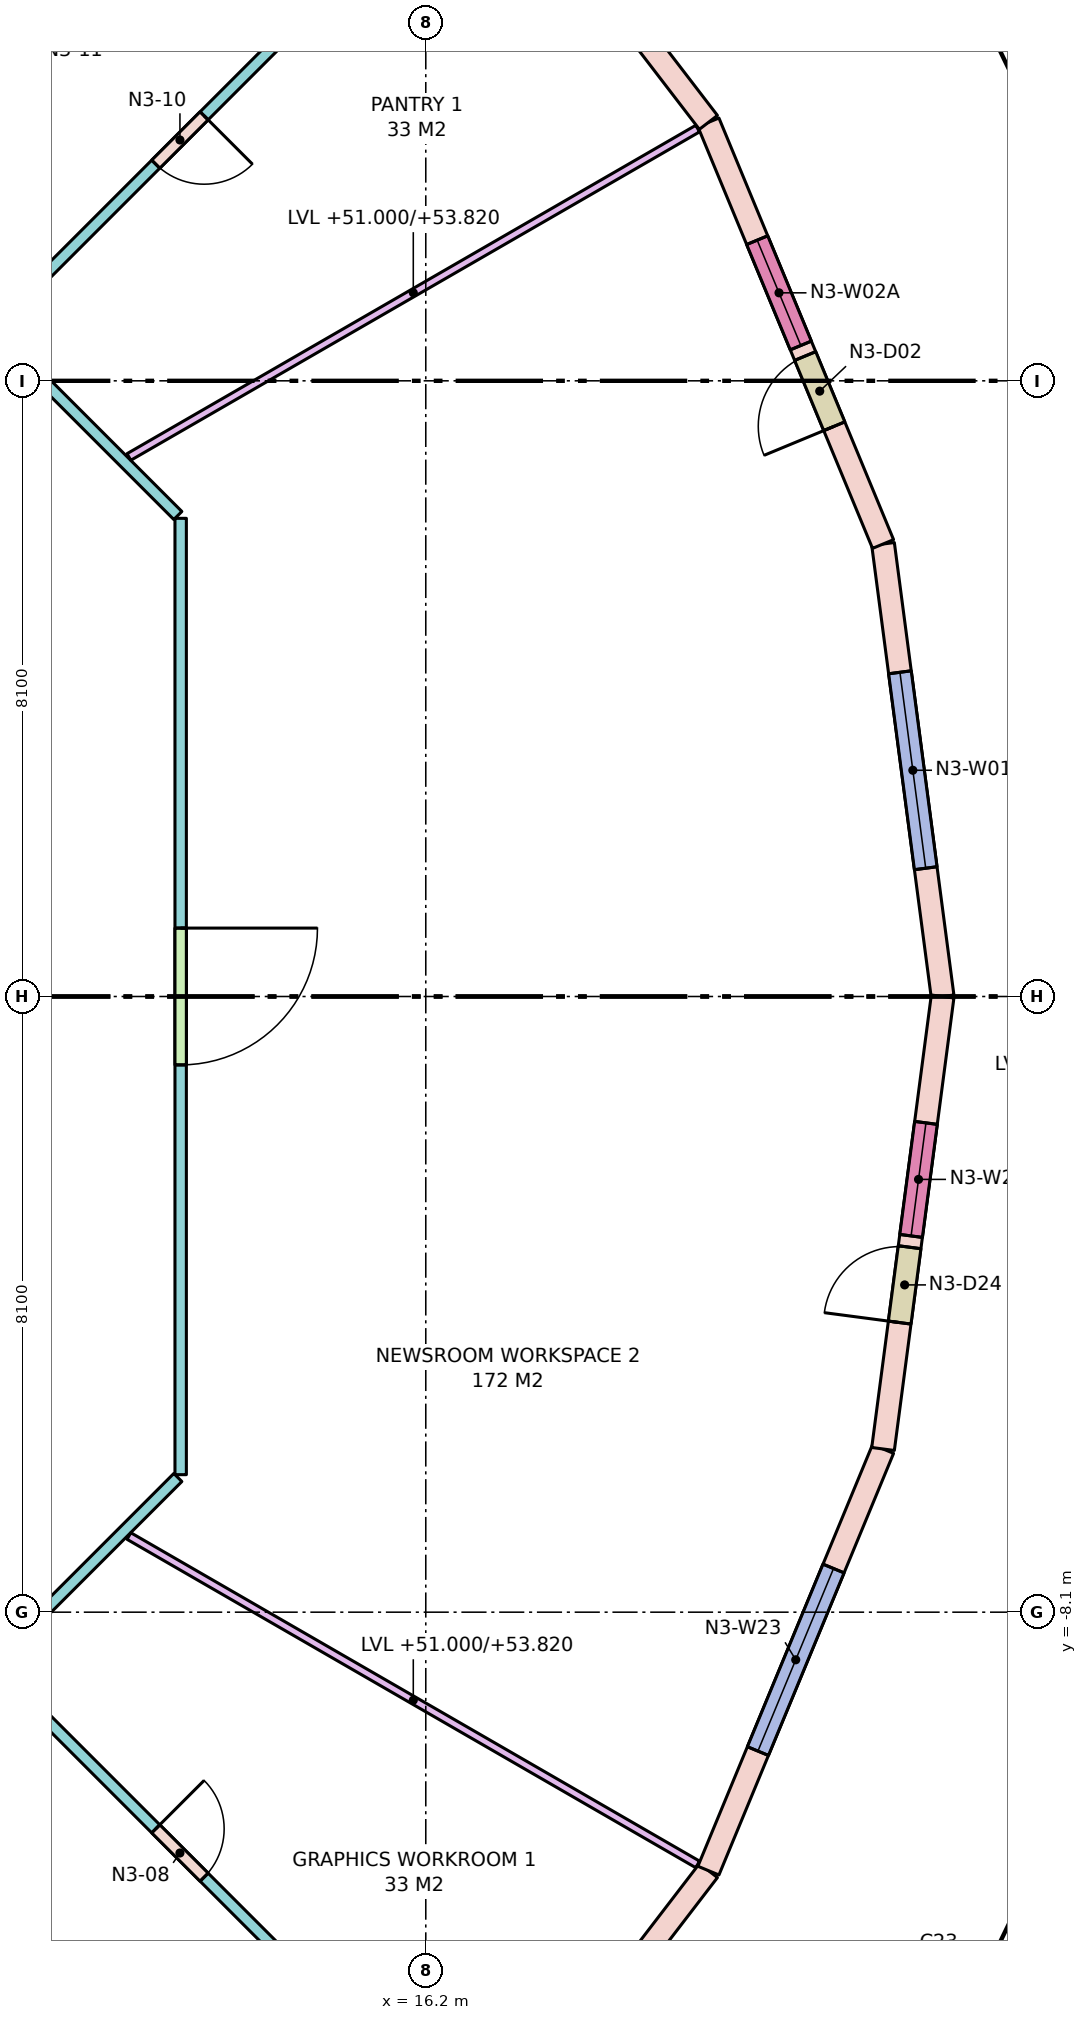
"""IFC4 building model, lengths in metres.
Left out: names, types, materials, properties, quantities, classifications, styles, units other than length and angle.
Written with IfcOpenShell. Run it as: python <this file> out.ifc"""

import sys

from ifc_helpers import new_model, si_unit, direction, frame, frame_2d, origin, place, context, subcontext, project, spatial, rectangle, extrude, element, fill, save


model = new_model("IFC4")
c1 = context("Model", 3, precision=1e-05, world=origin(), true_north=direction((0.0, 1.0)))
c2 = subcontext(c1, "Body", "Model", "MODEL_VIEW")
j1 = project(units=[si_unit("LENGTHUNIT", "METRE"), si_unit("PLANEANGLEUNIT", "RADIAN")], contexts=[c1])
p1 = place(None, origin())
s1 = spatial("IfcSite", under=j1, at=p1, CompositionType="ELEMENT")
p2 = place(p1, origin())
s2 = spatial("IfcBuilding", under=s1, at=p2, CompositionType="ELEMENT")
p3 = place(p2, frame((0.0, 0.0, 51.0)))
s3 = spatial("IfcBuildingStorey", under=s2, at=p3, CompositionType="ELEMENT", Elevation=51.0)
p4 = place(p3, frame((23.0, 0.0, 0.0), z_axis=(0.0, 0.0, 1.0), x_axis=(-0.130522880875, 0.991445297315, 0.0)))
e1 = element("IfcWall", 1, at=p4, inside=s3, PredefinedType="STANDARD", context=c2, shape_type="SweptSolid", body=[
    extrude(rectangle(XDim=6.004, YDim=0.3, at=frame_2d((3.002, 0.0))), origin(), (0.0, 0.0, 1.0), 3.72),
])
p5 = place(p4, frame((1.702, 0.0, 0.8)))
e2 = element("IfcOpeningElement", 2, at=p5, cuts=e1, PredefinedType="OPENING", context=c2, shape_type="SweptSolid", body=[
    extrude(rectangle(XDim=2.6, YDim=2.7, at=frame_2d((1.3, 1.35))), frame((0.0, 0.16, 0.0), z_axis=(0.0, -1.0, 0.0), x_axis=(1.0, 0.0, 0.0)), (0.0, 0.0, 1.0), 0.32),
])
p6 = place(p3, frame((22.216, 5.953, 0.0), z_axis=(0.0, 0.0, 1.0), x_axis=(-0.382671411433, 0.923884511653, 0.0)))
e3 = element("IfcWall", 3, at=p6, inside=s3, PredefinedType="STANDARD", context=c2, shape_type="SweptSolid", body=[
    extrude(rectangle(XDim=6.004, YDim=0.3, at=frame_2d((3.002, 0.0))), origin(), (0.0, 0.0, 1.0), 3.72),
])
p7 = place(p6, frame((1.677, 0.0, 0.0)))
e4 = element("IfcOpeningElement", 4, at=p7, cuts=e3, PredefinedType="OPENING", context=c2, shape_type="SweptSolid", body=[
    extrude(rectangle(XDim=1.0, YDim=2.4, at=frame_2d((0.5, 1.2))), frame((0.0, 0.16, 0.0), z_axis=(0.0, -1.0, 0.0), x_axis=(1.0, 0.0, 0.0)), (0.0, 0.0, 1.0), 0.32),
])
p8 = place(p6, frame((2.827, 0.0, 0.8)))
e5 = element("IfcOpeningElement", 5, at=p8, cuts=e3, PredefinedType="OPENING", context=c2, shape_type="SweptSolid", body=[
    extrude(rectangle(XDim=1.5, YDim=2.7, at=frame_2d((0.75, 1.35))), frame((0.0, 0.16, 0.0), z_axis=(0.0, -1.0, 0.0), x_axis=(1.0, 0.0, 0.0)), (0.0, 0.0, 1.0), 0.32),
])
p9 = place(p3, frame((19.919, 11.5, 0.0), z_axis=(0.0, 0.0, 1.0), x_axis=(-0.608778912074, 0.793339924758, 0.0)))
e6 = element("IfcWall", 6, at=p9, inside=s3, PredefinedType="STANDARD", context=c2, shape_type="SweptSolid", body=[
    extrude(rectangle(XDim=6.004, YDim=0.3, at=frame_2d((3.002, 0.0))), origin(), (0.0, 0.0, 1.0), 3.72),
])
p10 = place(p9, frame((1.702, 0.0, 0.8)))
e7 = element("IfcOpeningElement", 7, at=p10, cuts=e6, PredefinedType="OPENING", context=c2, shape_type="SweptSolid", body=[
    extrude(rectangle(XDim=2.6, YDim=2.7, at=frame_2d((1.3, 1.35))), frame((0.0, 0.16, 0.0), z_axis=(0.0, -1.0, 0.0), x_axis=(1.0, 0.0, 0.0)), (0.0, 0.0, 1.0), 0.32),
])
p11 = place(p3, frame((16.263, -16.263, 0.0), z_axis=(0.0, 0.0, 1.0), x_axis=(0.608778912074, 0.793339924758, 0.0)))
e8 = element("IfcWall", 8, at=p11, inside=s3, PredefinedType="STANDARD", context=c2, shape_type="SweptSolid", body=[
    extrude(rectangle(XDim=6.004, YDim=0.3, at=frame_2d((3.002, 0.0))), origin(), (0.0, 0.0, 1.0), 3.72),
])
p12 = place(p11, frame((1.677, 0.0, 0.0)))
e9 = element("IfcOpeningElement", 9, at=p12, cuts=e8, PredefinedType="OPENING", context=c2, shape_type="SweptSolid", body=[
    extrude(rectangle(XDim=1.0, YDim=2.4, at=frame_2d((0.5, 1.2))), frame((0.0, 0.16, 0.0), z_axis=(0.0, -1.0, 0.0), x_axis=(1.0, 0.0, 0.0)), (0.0, 0.0, 1.0), 0.32),
])
p13 = place(p11, frame((2.827, 0.0, 0.8)))
e10 = element("IfcOpeningElement", 10, at=p13, cuts=e8, PredefinedType="OPENING", context=c2, shape_type="SweptSolid", body=[
    extrude(rectangle(XDim=1.5, YDim=2.7, at=frame_2d((0.75, 1.35))), frame((0.0, 0.16, 0.0), z_axis=(0.0, -1.0, 0.0), x_axis=(1.0, 0.0, 0.0)), (0.0, 0.0, 1.0), 0.32),
])
p14 = place(p3, frame((19.919, -11.5, 0.0), z_axis=(0.0, 0.0, 1.0), x_axis=(0.382671411433, 0.923884511653, 0.0)))
e11 = element("IfcWall", 11, at=p14, inside=s3, PredefinedType="STANDARD", context=c2, shape_type="SweptSolid", body=[
    extrude(rectangle(XDim=6.004, YDim=0.3, at=frame_2d((3.002, 0.0))), origin(), (0.0, 0.0, 1.0), 3.72),
])
p15 = place(p14, frame((1.702, 0.0, 0.8)))
e12 = element("IfcOpeningElement", 12, at=p15, cuts=e11, PredefinedType="OPENING", context=c2, shape_type="SweptSolid", body=[
    extrude(rectangle(XDim=2.6, YDim=2.7, at=frame_2d((1.3, 1.35))), frame((0.0, 0.16, 0.0), z_axis=(0.0, -1.0, 0.0), x_axis=(1.0, 0.0, 0.0)), (0.0, 0.0, 1.0), 0.32),
])
p16 = place(p3, frame((22.216, -5.953, 0.0), z_axis=(0.0, 0.0, 1.0), x_axis=(0.130522880875, 0.991445297315, 0.0)))
e13 = element("IfcWall", 13, at=p16, inside=s3, PredefinedType="STANDARD", context=c2, shape_type="SweptSolid", body=[
    extrude(rectangle(XDim=6.004, YDim=0.3, at=frame_2d((3.002, 0.0))), origin(), (0.0, 0.0, 1.0), 3.72),
])
p17 = place(p16, frame((1.677, 0.0, 0.0)))
e14 = element("IfcOpeningElement", 14, at=p17, cuts=e13, PredefinedType="OPENING", context=c2, shape_type="SweptSolid", body=[
    extrude(rectangle(XDim=1.0, YDim=2.4, at=frame_2d((0.5, 1.2))), frame((0.0, 0.16, 0.0), z_axis=(0.0, -1.0, 0.0), x_axis=(1.0, 0.0, 0.0)), (0.0, 0.0, 1.0), 0.32),
])
p18 = place(p16, frame((2.827, 0.0, 0.8)))
e15 = element("IfcOpeningElement", 15, at=p18, cuts=e13, PredefinedType="OPENING", context=c2, shape_type="SweptSolid", body=[
    extrude(rectangle(XDim=1.5, YDim=2.7, at=frame_2d((0.75, 1.35))), frame((0.0, 0.16, 0.0), z_axis=(0.0, -1.0, 0.0), x_axis=(1.0, 0.0, 0.0)), (0.0, 0.0, 1.0), 0.32),
])
p19 = place(p3, frame((13.752, -15.449, 0.0), z_axis=(0.0, 0.0, 1.0), x_axis=(-0.707089406061, 0.707124155885, 0.0)))
e16 = element("IfcWall", 16, at=p19, inside=s3, PredefinedType="PARTITIONING", context=c2, shape_type="SweptSolid", body=[
    extrude(rectangle(XDim=7.026, YDim=0.15, at=frame_2d((3.513, 0.0))), origin(), (0.0, 0.0, 1.0), 3.72),
])
p20 = place(p19, frame((3.013, 0.0, 0.0)))
e17 = element("IfcOpeningElement", 17, at=p20, cuts=e16, PredefinedType="OPENING", context=c2, shape_type="SweptSolid", body=[
    extrude(rectangle(XDim=1.0, YDim=2.1, at=frame_2d((0.5, 1.05))), frame((0.0, 0.085, 0.0), z_axis=(0.0, -1.0, 0.0), x_axis=(1.0, 0.0, 0.0)), (0.0, 0.0, 1.0), 0.17),
])
p21 = place(p3, frame((8.784, 10.481, 0.0), z_axis=(0.0, 0.0, 1.0), x_axis=(0.707089406061, 0.707124155885, 0.0)))
e18 = element("IfcWall", 18, at=p21, inside=s3, PredefinedType="PARTITIONING", context=c2, shape_type="SweptSolid", body=[
    extrude(rectangle(XDim=7.026, YDim=0.15, at=frame_2d((3.513, 0.0))), origin(), (0.0, 0.0, 1.0), 3.72),
])
p22 = place(p21, frame((3.063, 0.0, 0.0)))
e19 = element("IfcOpeningElement", 19, at=p22, cuts=e18, PredefinedType="OPENING", context=c2, shape_type="SweptSolid", body=[
    extrude(rectangle(XDim=0.9, YDim=2.1, at=frame_2d((0.45, 1.05))), frame((0.0, 0.085, 0.0), z_axis=(0.0, -1.0, 0.0), x_axis=(1.0, 0.0, 0.0)), (0.0, 0.0, 1.0), 0.17),
])
p23 = place(p3, frame((15.449, 13.752, 0.0), z_axis=(0.0, 0.0, 1.0), x_axis=(-0.707124155885, -0.707089406061, 0.0)))
e20 = element("IfcWall", 20, at=p23, inside=s3, PredefinedType="PARTITIONING", context=c2, shape_type="SweptSolid", body=[
    extrude(rectangle(XDim=7.026, YDim=0.15, at=frame_2d((3.513, 0.0))), origin(), (0.0, 0.0, 1.0), 3.72),
])
p24 = place(p23, frame((3.063, 0.0, 0.0)))
e21 = element("IfcOpeningElement", 21, at=p24, cuts=e20, PredefinedType="OPENING", context=c2, shape_type="SweptSolid", body=[
    extrude(rectangle(XDim=0.9, YDim=2.1, at=frame_2d((0.45, 1.05))), frame((0.0, 0.085, 0.0), z_axis=(0.0, -1.0, 0.0), x_axis=(1.0, 0.0, 0.0)), (0.0, 0.0, 1.0), 0.17),
])
p25 = place(p3, frame((10.534, 8.731, 0.0), z_axis=(0.0, 0.0, 1.0), x_axis=(0.707106781187, -0.707106781187, 0.0)))
e22 = element("IfcWall", 22, at=p25, inside=s3, PredefinedType="PARTITIONING", context=c2, shape_type="SweptSolid", body=[
    extrude(rectangle(XDim=3.399, YDim=0.15, at=frame_2d((1.7, 0.0))), origin(), (0.0, 0.0, 1.0), 2.82),
])
p26 = place(p3, frame((12.975, 6.291, 0.0), z_axis=(0.0, 0.0, 1.0), x_axis=(0.0, -1.0, 0.0)))
e23 = element("IfcWall", 23, at=p26, inside=s3, PredefinedType="PARTITIONING", context=c2, shape_type="SweptSolid", body=[
    extrude(rectangle(XDim=12.582, YDim=0.15, at=frame_2d((6.291, 0.0))), origin(), (0.0, 0.0, 1.0), 2.82),
])
p27 = place(p26, frame((5.391, 0.0, 0.0)))
e24 = element("IfcOpeningElement", 24, at=p27, cuts=e23, PredefinedType="OPENING", context=c2, shape_type="SweptSolid", body=[
    extrude(rectangle(XDim=1.8, YDim=2.1, at=frame_2d((0.9, 1.05))), frame((0.0, 0.085, 0.0), z_axis=(0.0, -1.0, 0.0), x_axis=(1.0, 0.0, 0.0)), (0.0, 0.0, 1.0), 0.17),
])
p28 = place(p3, frame((12.938, -6.328, 0.0), z_axis=(0.0, 0.0, 1.0), x_axis=(-0.707106781187, -0.707106781187, 0.0)))
e25 = element("IfcWall", 25, at=p28, inside=s3, PredefinedType="PARTITIONING", context=c2, shape_type="SweptSolid", body=[
    extrude(rectangle(XDim=3.399, YDim=0.15, at=frame_2d((1.7, 0.0))), origin(), (0.0, 0.0, 1.0), 2.82),
])
p29 = place(p3, frame((10.481, -8.784, 0.0), z_axis=(0.0, 0.0, 1.0), x_axis=(0.707124155885, -0.707089406061, 0.0)))
e26 = element("IfcWall", 26, at=p29, inside=s3, PredefinedType="PARTITIONING", context=c2, shape_type="SweptSolid", body=[
    extrude(rectangle(XDim=7.026, YDim=0.15, at=frame_2d((3.513, 0.0))), origin(), (0.0, 0.0, 1.0), 3.72),
])
p30 = place(p29, frame((3.063, 0.0, 0.0)))
e27 = element("IfcOpeningElement", 27, at=p30, cuts=e26, PredefinedType="OPENING", context=c2, shape_type="SweptSolid", body=[
    extrude(rectangle(XDim=0.9, YDim=2.1, at=frame_2d((0.45, 1.05))), frame((0.0, 0.085, 0.0), z_axis=(0.0, -1.0, 0.0), x_axis=(1.0, 0.0, 0.0)), (0.0, 0.0, 1.0), 0.17),
])
p31 = place(p3, frame((12.294, 7.098, 0.0), z_axis=(0.0, 0.0, 1.0), x_axis=(0.866010547425, 0.500025731086, 0.0)))
e28 = element("IfcWall", 28, at=p31, inside=s3, PredefinedType="PARTITIONING", context=c2, shape_type="SweptSolid", body=[
    extrude(rectangle(XDim=8.641, YDim=0.1, at=frame_2d((4.32, 0.0))), origin(), (0.0, 0.0, 1.0), 2.82),
])
p32 = place(p3, frame((6.394, 11.075, 0.0), z_axis=(0.0, 0.0, 1.0), x_axis=(0.500024592647, 0.866011204747, 0.0)))
e29 = element("IfcWall", 29, at=p32, inside=s3, PredefinedType="PARTITIONING", context=c2, shape_type="SweptSolid", body=[
    extrude(rectangle(XDim=10.049, YDim=0.1, at=frame_2d((5.024, 0.0))), origin(), (0.0, 0.0, 1.0), 2.82),
])
p33 = place(p3, frame((12.294, -7.098, 0.0), z_axis=(0.0, 0.0, 1.0), x_axis=(0.866010547425, -0.500025731086, 0.0)))
e30 = element("IfcWall", 30, at=p33, inside=s3, PredefinedType="PARTITIONING", context=c2, shape_type="SweptSolid", body=[
    extrude(rectangle(XDim=8.641, YDim=0.1, at=frame_2d((4.32, 0.0))), origin(), (0.0, 0.0, 1.0), 2.82),
])
p34 = place(p5, origin())
e31 = element("IfcWindow", 31, at=p34, inside=s3, PartitioningType="SINGLE_PANEL", PredefinedType="WINDOW", context=c2, shape_type="SweptSolid", body=[
    extrude(rectangle(XDim=2.6, YDim=2.7, at=frame_2d((1.3, 1.35))), frame((0.0, 0.03, 0.0), z_axis=(0.0, -1.0, 0.0), x_axis=(1.0, 0.0, 0.0)), (0.0, 0.0, 1.0), 0.06),
])
fill(e2, e31)
p35 = place(p7, origin())
e32 = element("IfcDoor", 32, at=p35, inside=s3, OperationType="SINGLE_SWING_LEFT", PredefinedType="DOOR", context=c2, shape_type="SweptSolid", body=[
    extrude(rectangle(XDim=1.0, YDim=2.4, at=frame_2d((0.5, 1.2))), frame((0.0, 0.025, 0.0), z_axis=(0.0, -1.0, 0.0), x_axis=(1.0, 0.0, 0.0)), (0.0, 0.0, 1.0), 0.05),
])
fill(e4, e32)
p36 = place(p8, origin())
e33 = element("IfcWindow", 33, at=p36, inside=s3, PartitioningType="SINGLE_PANEL", PredefinedType="WINDOW", context=c2, shape_type="SweptSolid", body=[
    extrude(rectangle(XDim=1.5, YDim=2.7, at=frame_2d((0.75, 1.35))), frame((0.0, 0.03, 0.0), z_axis=(0.0, -1.0, 0.0), x_axis=(1.0, 0.0, 0.0)), (0.0, 0.0, 1.0), 0.06),
])
fill(e5, e33)
p37 = place(p15, origin())
e34 = element("IfcWindow", 34, at=p37, inside=s3, PartitioningType="SINGLE_PANEL", PredefinedType="WINDOW", context=c2, shape_type="SweptSolid", body=[
    extrude(rectangle(XDim=2.6, YDim=2.7, at=frame_2d((1.3, 1.35))), frame((0.0, 0.03, 0.0), z_axis=(0.0, -1.0, 0.0), x_axis=(1.0, 0.0, 0.0)), (0.0, 0.0, 1.0), 0.06),
])
fill(e12, e34)
p38 = place(p17, origin())
e35 = element("IfcDoor", 35, at=p38, inside=s3, OperationType="SINGLE_SWING_LEFT", PredefinedType="DOOR", context=c2, shape_type="SweptSolid", body=[
    extrude(rectangle(XDim=1.0, YDim=2.4, at=frame_2d((0.5, 1.2))), frame((0.0, 0.025, 0.0), z_axis=(0.0, -1.0, 0.0), x_axis=(1.0, 0.0, 0.0)), (0.0, 0.0, 1.0), 0.05),
])
fill(e14, e35)
p39 = place(p18, origin())
e36 = element("IfcWindow", 36, at=p39, inside=s3, PartitioningType="SINGLE_PANEL", PredefinedType="WINDOW", context=c2, shape_type="SweptSolid", body=[
    extrude(rectangle(XDim=1.5, YDim=2.7, at=frame_2d((0.75, 1.35))), frame((0.0, 0.03, 0.0), z_axis=(0.0, -1.0, 0.0), x_axis=(1.0, 0.0, 0.0)), (0.0, 0.0, 1.0), 0.06),
])
fill(e15, e36)
p40 = place(p30, origin())
e37 = element("IfcDoor", 37, at=p40, inside=s3, OperationType="SINGLE_SWING_LEFT", PredefinedType="DOOR", context=c2, shape_type="SweptSolid", body=[
    extrude(rectangle(XDim=0.9, YDim=2.1, at=frame_2d((0.45, 1.05))), frame((0.0, 0.025, 0.0), z_axis=(0.0, -1.0, 0.0), x_axis=(1.0, 0.0, 0.0)), (0.0, 0.0, 1.0), 0.05),
])
fill(e27, e37)
p41 = place(p27, origin())
e38 = element("IfcDoor", 38, at=p41, inside=s3, OperationType="DOUBLE_DOOR_SINGLE_SWING", PredefinedType="DOOR", context=c2, shape_type="SweptSolid", body=[
    extrude(rectangle(XDim=1.8, YDim=2.1, at=frame_2d((0.9, 1.05))), frame((0.0, 0.025, 0.0), z_axis=(0.0, -1.0, 0.0), x_axis=(1.0, 0.0, 0.0)), (0.0, 0.0, 1.0), 0.05),
])
fill(e24, e38)
p42 = place(p24, origin())
e39 = element("IfcDoor", 39, at=p42, inside=s3, OperationType="SINGLE_SWING_LEFT", PredefinedType="DOOR", context=c2, shape_type="SweptSolid", body=[
    extrude(rectangle(XDim=0.9, YDim=2.1, at=frame_2d((0.45, 1.05))), frame((0.0, 0.025, 0.0), z_axis=(0.0, -1.0, 0.0), x_axis=(1.0, 0.0, 0.0)), (0.0, 0.0, 1.0), 0.05),
])
fill(e21, e39)
save(model, sys.argv[1])
